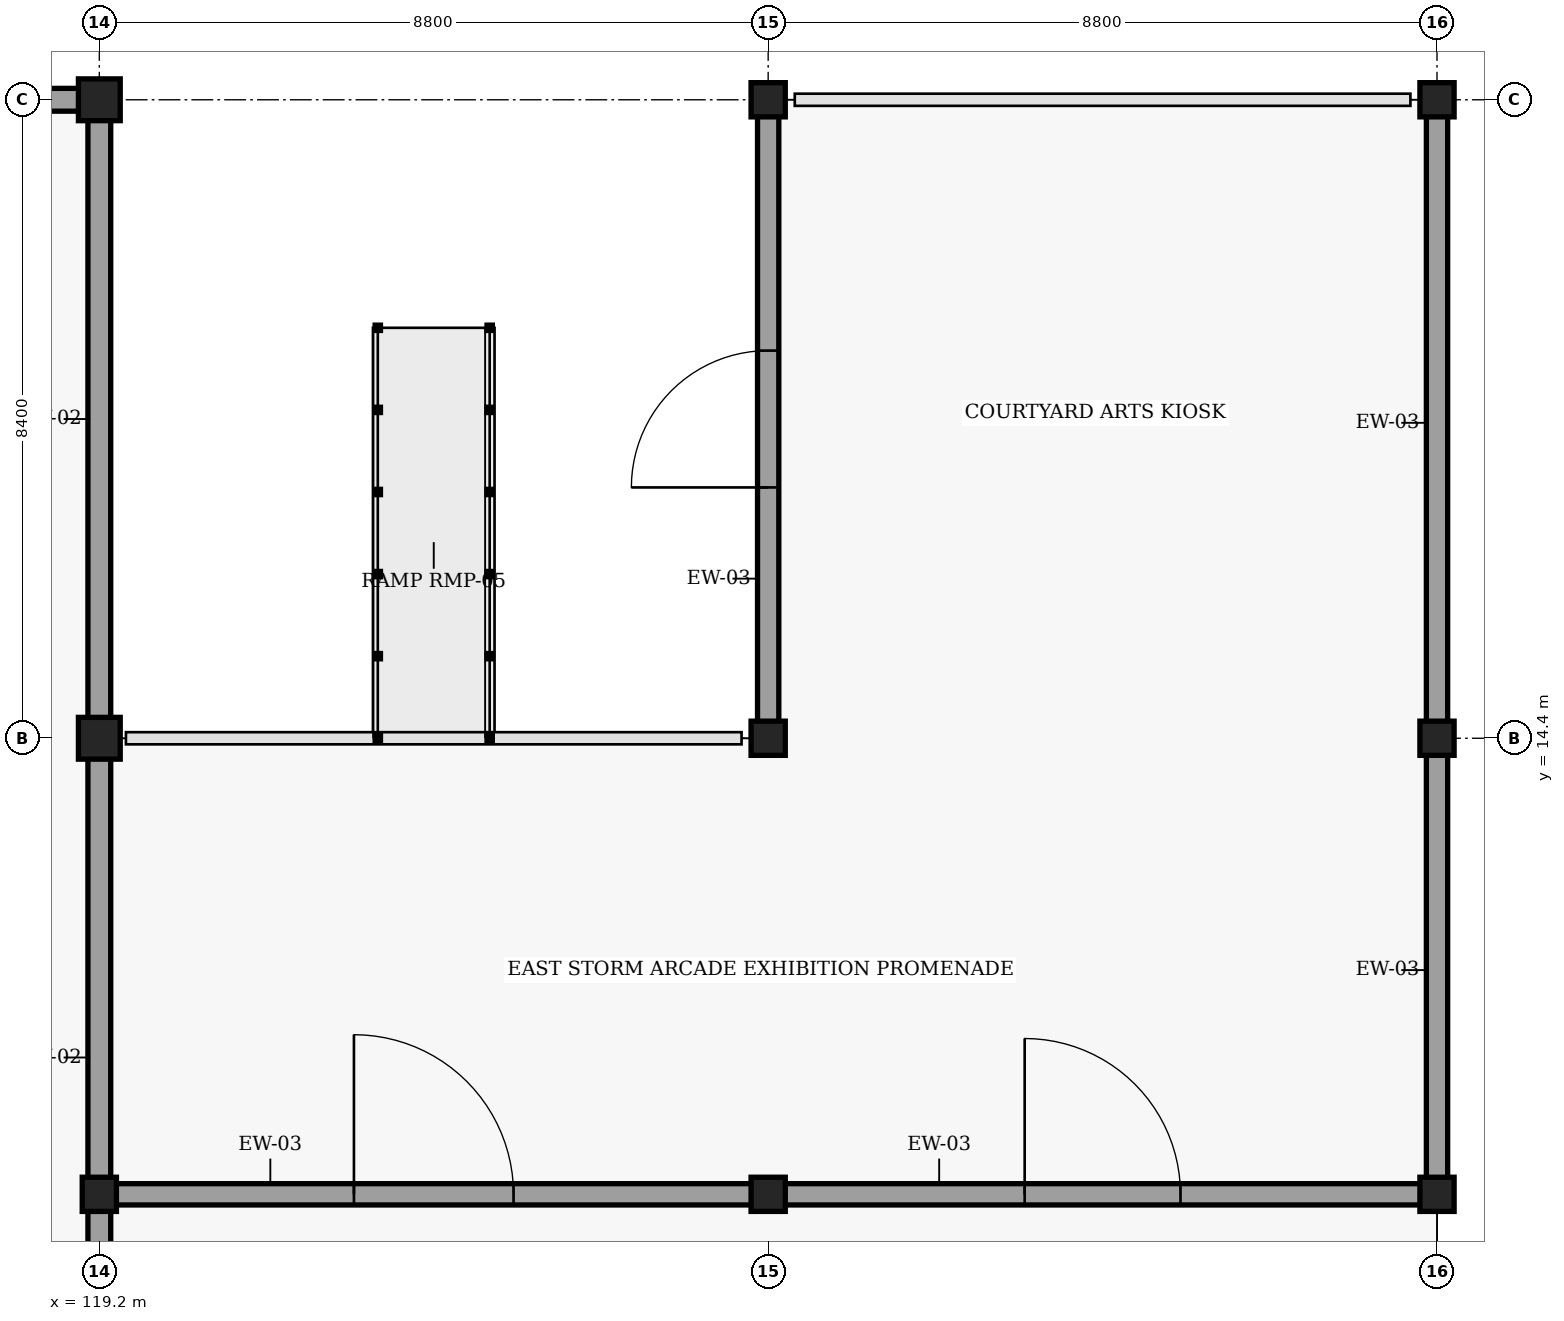
"""IFC4 building model, lengths in metres.
Left out: names, types, materials, properties, quantities, classifications, styles, units other than length and angle.
Written with IfcOpenShell. Run it as: python <this file> out.ifc"""

import sys

from ifc_helpers import new_model, si_unit, direction, frame, frame_2d, origin, origin_2d, place, context, subcontext, project, spatial, rectangle, extrude, element, fill, save


model = new_model("IFC4")
c1 = context("Model", 3, precision=1e-05, world=origin(), true_north=direction((0.0, 1.0)))
c2 = subcontext(c1, "Body", "Model", "MODEL_VIEW")
j1 = project(units=[si_unit("LENGTHUNIT", "METRE"), si_unit("PLANEANGLEUNIT", "RADIAN")], contexts=[c1])
p1 = place(None, origin())
s1 = spatial("IfcSite", under=j1, at=p1, CompositionType="ELEMENT")
p2 = place(p1, origin())
s2 = spatial("IfcBuilding", under=s1, at=p2, CompositionType="ELEMENT")
p3 = place(p2, origin())
s3 = spatial("IfcBuildingStorey", under=s2, at=p3, CompositionType="ELEMENT", Elevation=0.0)
for number, where, z_axis, x_axis in (
    (1, (119.2, 14.4, 0.0), (0.0, 0.0, 1.0), (1.0, 0.0, 0.0)),
    (2, (119.2, 22.8, 0.0), (0.0, 0.0, 1.0), (1.0, 0.0, 0.0)),
):
    element("IfcColumn", number, at=place(p3, frame(where, z_axis=z_axis, x_axis=x_axis)), inside=s3, PredefinedType="COLUMN", context=c2, shape_type="SweptSolid", body=[
        extrude(rectangle(XDim=0.55, YDim=0.55, at=origin_2d()), origin(), (0.0, 0.0, 1.0), 4.8),
    ])
for number, where, z_axis, x_axis in (
    (3, (128.0, 8.4, 0.0), (0.0, 0.0, 1.0), (1.0, 0.0, 0.0)),
    (4, (128.0, 14.4, 0.0), (0.0, 0.0, 1.0), (1.0, 0.0, 0.0)),
    (5, (128.0, 22.8, 0.0), (0.0, 0.0, 1.0), (1.0, 0.0, 0.0)),
    (6, (136.8, 8.4, 0.0), (0.0, 0.0, 1.0), (1.0, 0.0, 0.0)),
    (7, (136.8, 14.4, 0.0), (0.0, 0.0, 1.0), (1.0, 0.0, 0.0)),
    (8, (136.8, 22.8, 0.0), (0.0, 0.0, 1.0), (1.0, 0.0, 0.0)),
    (9, (119.2, 8.4, 0.0), (0.0, 0.0, 1.0), (1.0, 0.0, 0.0)),
):
    element("IfcColumn", number, at=place(p3, frame(where, z_axis=z_axis, x_axis=x_axis)), inside=s3, PredefinedType="COLUMN", context=c2, shape_type="SweptSolid", body=[
        extrude(rectangle(XDim=0.45, YDim=0.45, at=origin_2d()), origin(), (0.0, 0.0, 1.0), 4.8),
    ])
p4 = place(p3, frame((110.5, 22.8, 0.0), z_axis=(0.0, 0.0, 1.0), x_axis=(1.0, 0.0, 0.0)))
e10 = element("IfcWall", 10, at=p4, inside=s3, PredefinedType="SOLIDWALL", context=c2, shape_type="SweptSolid", body=[
    extrude(rectangle(XDim=8.6, YDim=0.3, at=frame_2d((4.3, 0.0))), origin(), (0.0, 0.0, 1.0), 4.065),
])
p5 = place(p4, frame((2.2, 0.0, 0.0)))
e11 = element("IfcOpeningElement", 11, at=p5, cuts=e10, PredefinedType="OPENING", context=c2, shape_type="SweptSolid", body=[
    extrude(rectangle(XDim=4.2, YDim=3.6, at=frame_2d((2.1, 1.8))), frame((0.0, 0.16, 0.0), z_axis=(0.0, -1.0, 0.0), x_axis=(1.0, 0.0, 0.0)), (0.0, 0.0, 1.0), 0.32),
])
for number, where, z_axis, x_axis in (
    (12, (119.2, 6.1, 0.0), (0.0, 0.0, 1.0), (0.0, 1.0, 0.0)),
    (13, (119.2, 14.5, 0.0), (0.0, 0.0, 1.0), (0.0, 1.0, 0.0)),
):
    element("IfcWall", number, at=place(p3, frame(where, z_axis=z_axis, x_axis=x_axis)), inside=s3, PredefinedType="SOLIDWALL", context=c2, shape_type="SweptSolid", body=[
        extrude(rectangle(XDim=8.2, YDim=0.3, at=frame_2d((4.1, 0.0))), origin(), (0.0, 0.0, 1.0), 4.085),
    ])
p6 = place(p3, frame((119.3, 8.4, 0.0), z_axis=(0.0, 0.0, 1.0), x_axis=(1.0, 0.0, 0.0)))
e14 = element("IfcWall", 14, at=p6, inside=s3, PredefinedType="SOLIDWALL", context=c2, shape_type="SweptSolid", body=[
    extrude(rectangle(XDim=8.6, YDim=0.28, at=frame_2d((4.3, 0.0))), origin(), (0.0, 0.0, 1.0), 4.135),
])
p7 = place(p6, frame((3.25, 0.0, 0.0)))
e15 = element("IfcOpeningElement", 15, at=p7, cuts=e14, PredefinedType="OPENING", context=c2, shape_type="SweptSolid", body=[
    extrude(rectangle(XDim=2.1, YDim=2.35, at=frame_2d((1.05, 1.175))), frame((0.0, 0.15, 0.0), z_axis=(0.0, -1.0, 0.0), x_axis=(1.0, 0.0, 0.0)), (0.0, 0.0, 1.0), 0.3),
])
p8 = place(p3, frame((128.1, 8.4, 0.0), z_axis=(0.0, 0.0, 1.0), x_axis=(1.0, 0.0, 0.0)))
e16 = element("IfcWall", 16, at=p8, inside=s3, PredefinedType="SOLIDWALL", context=c2, shape_type="SweptSolid", body=[
    extrude(rectangle(XDim=8.6, YDim=0.28, at=frame_2d((4.3, 0.0))), origin(), (0.0, 0.0, 1.0), 4.135),
])
p9 = place(p8, frame((3.275, 0.0, 0.0)))
e17 = element("IfcOpeningElement", 17, at=p9, cuts=e16, PredefinedType="OPENING", context=c2, shape_type="SweptSolid", body=[
    extrude(rectangle(XDim=2.05, YDim=2.32, at=frame_2d((1.025, 1.16))), frame((0.0, 0.15, 0.0), z_axis=(0.0, -1.0, 0.0), x_axis=(1.0, 0.0, 0.0)), (0.0, 0.0, 1.0), 0.3),
])
p10 = place(p3, frame((128.0, 14.45, 0.0), z_axis=(0.0, 0.0, 1.0), x_axis=(0.0, 1.0, 0.0)))
e18 = element("IfcWall", 18, at=p10, inside=s3, PredefinedType="SOLIDWALL", context=c2, shape_type="SweptSolid", body=[
    extrude(rectangle(XDim=8.2, YDim=0.28, at=frame_2d((4.1, 0.0))), origin(), (0.0, 0.0, 1.0), 4.085),
])
p11 = place(p10, frame((3.25, 0.0, 0.0)))
e19 = element("IfcOpeningElement", 19, at=p11, cuts=e18, PredefinedType="OPENING", context=c2, shape_type="SweptSolid", body=[
    extrude(rectangle(XDim=1.8, YDim=2.25, at=frame_2d((0.9, 1.125))), frame((0.0, 0.15, 0.0), z_axis=(0.0, -1.0, 0.0), x_axis=(1.0, 0.0, 0.0)), (0.0, 0.0, 1.0), 0.3),
])
p12 = place(p3, frame((136.8, 8.45, 0.0), z_axis=(0.0, 0.0, 1.0), x_axis=(0.0, 1.0, 0.0)))
e20 = element("IfcWall", 20, at=p12, inside=s3, PredefinedType="SOLIDWALL", context=c2, shape_type="SweptSolid", body=[
    extrude(rectangle(XDim=5.8, YDim=0.28, at=frame_2d((2.9, 0.0))), origin(), (0.0, 0.0, 1.0), 4.085),
])
p13 = place(p3, frame((136.8, 14.45, 0.0), z_axis=(0.0, 0.0, 1.0), x_axis=(0.0, 1.0, 0.0)))
e21 = element("IfcWall", 21, at=p13, inside=s3, PredefinedType="SOLIDWALL", context=c2, shape_type="SweptSolid", body=[
    extrude(rectangle(XDim=8.2, YDim=0.28, at=frame_2d((4.1, 0.0))), origin(), (0.0, 0.0, 1.0), 4.085),
])
p14 = place(p7, origin())
e22 = element("IfcDoor", 22, at=p14, inside=s3, OperationType="DOUBLE_DOOR_SINGLE_SWING", PredefinedType="DOOR", context=c2, shape_type="SweptSolid", body=[
    extrude(rectangle(XDim=2.1, YDim=2.35, at=frame_2d((1.05, 1.175))), frame((0.0, 0.025, 0.0), z_axis=(0.0, -1.0, 0.0), x_axis=(1.0, 0.0, 0.0)), (0.0, 0.0, 1.0), 0.05),
])
fill(e15, e22)
p15 = place(p9, origin())
e23 = element("IfcDoor", 23, at=p15, inside=s3, OperationType="DOUBLE_DOOR_SINGLE_SWING", PredefinedType="GATE", context=c2, shape_type="SweptSolid", body=[
    extrude(rectangle(XDim=2.05, YDim=2.32, at=frame_2d((1.025, 1.16))), frame((0.0, 0.025, 0.0), z_axis=(0.0, -1.0, 0.0), x_axis=(1.0, 0.0, 0.0)), (0.0, 0.0, 1.0), 0.05),
])
fill(e17, e23)
p16 = place(p11, origin())
e24 = element("IfcDoor", 24, at=p16, inside=s3, OperationType="DOUBLE_DOOR_SINGLE_SWING", PredefinedType="DOOR", context=c2, shape_type="SweptSolid", body=[
    extrude(rectangle(XDim=1.8, YDim=2.25, at=frame_2d((0.9, 1.125))), frame((0.0, 0.025, 0.0), z_axis=(0.0, -1.0, 0.0), x_axis=(1.0, 0.0, 0.0)), (0.0, 0.0, 1.0), 0.05),
])
fill(e19, e24)
save(model, sys.argv[1])
